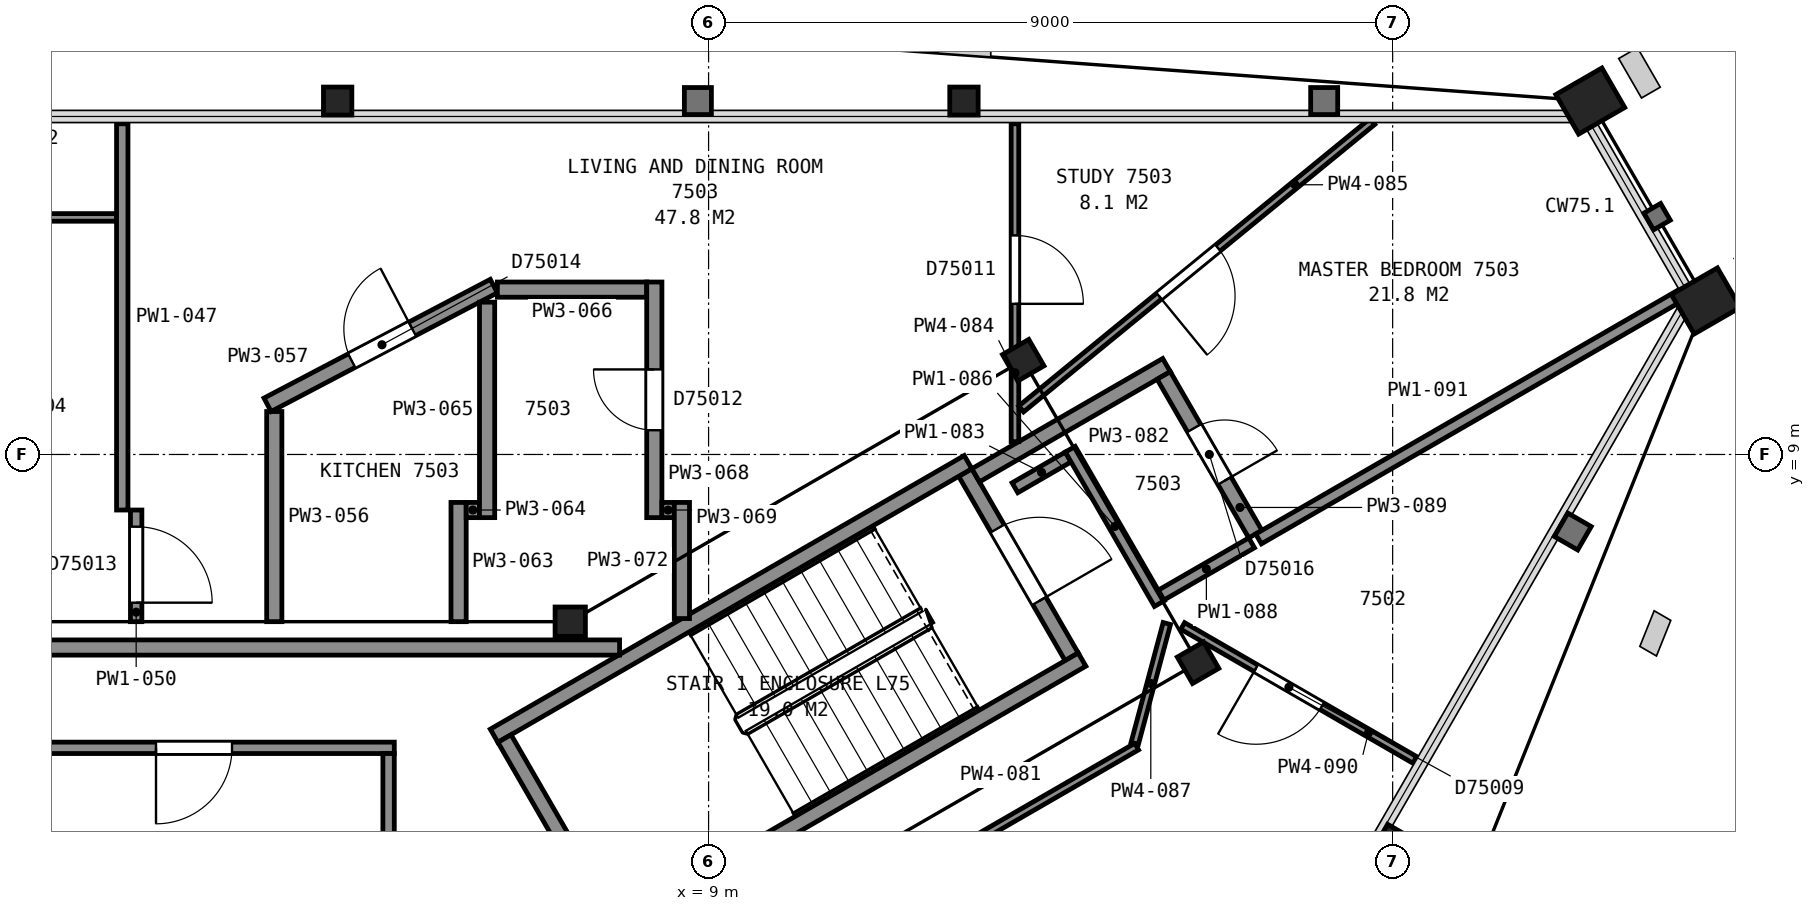
"""IFC4 building model, lengths in metres.
Left out: names, types, materials, properties, quantities, classifications, styles, units other than length and angle.
Written with IfcOpenShell. Run it as: python <this file> out.ifc"""

import sys

from ifc_helpers import new_model, si_unit, direction, frame, frame_2d, origin, origin_2d, place, context, subcontext, project, spatial, rectangle, hollow_rectangle, i_section, extrude, element, fill, save


model = new_model("IFC4")
c1 = context("Model", 3, precision=1e-05, world=origin(), true_north=direction((0.0, 1.0)))
c2 = subcontext(c1, "Body", "Model", "MODEL_VIEW")
j1 = project(units=[si_unit("LENGTHUNIT", "METRE"), si_unit("PLANEANGLEUNIT", "RADIAN")], contexts=[c1])
p1 = place(None, origin())
s1 = spatial("IfcSite", under=j1, at=p1, CompositionType="ELEMENT")
p2 = place(p1, origin())
s2 = spatial("IfcBuilding", under=s1, at=p2, CompositionType="ELEMENT")
p3 = place(p2, frame((0.0, 0.0, 297.3)))
s3 = spatial("IfcBuildingStorey", under=s2, at=p3, CompositionType="ELEMENT", Elevation=297.3)
p4 = place(p3, frame((20.6, 13.65, 0.0), z_axis=(0.0, 0.0, 1.0), x_axis=(0.5, -0.866025403784, 0.0)))
e1 = element("IfcColumn", 1, at=p4, inside=s3, PredefinedType="COLUMN", context=c2, shape_type="SweptSolid", body=[
    extrude(hollow_rectangle(XDim=0.6, YDim=0.7, WallThickness=0.04, at=origin_2d()), origin(), (0.0, 0.0, 1.0), 3.7),
])
for number, where, z_axis, x_axis in (
    (2, (12.36, 13.65, 0.0), (0.0, 0.0, 1.0), (1.0, 0.0, 0.0)),
    (3, (4.12, 13.65, 0.0), (0.0, 0.0, 1.0), (1.0, 0.0, 0.0)),
    (4, (18.0, 3.88, 0.0), (0.0, 0.0, 1.0), (-0.5, -0.866, 0.0)),
):
    element("IfcColumn", number, at=place(p3, frame(where, z_axis=z_axis, x_axis=x_axis)), inside=s3, PredefinedType="COLUMN", context=c2, shape_type="SweptSolid", body=[
        extrude(i_section(OverallWidth=0.373, OverallDepth=0.368, WebThickness=0.015, FlangeThickness=0.024, FilletRadius=0.015, at=origin_2d()), origin(), (0.0, 0.0, 1.0), 3.7),
    ])
p5 = place(p3, frame((22.12, 11.02, 0.0), z_axis=(0.0, 0.0, 1.0), x_axis=(0.5, -0.866025403784, 0.0)))
e5 = element("IfcColumn", 5, at=p5, inside=s3, PredefinedType="COLUMN", context=c2, shape_type="SweptSolid", body=[
    extrude(hollow_rectangle(XDim=0.6, YDim=0.7, WallThickness=0.04, at=origin_2d()), origin(), (0.0, 0.0, 1.0), 3.7),
])
for number, where, z_axis, x_axis in (
    (6, (15.44, 6.26, 0.0), (0.0, 0.0, 1.0), (0.5, -0.866, 0.0)),
    (7, (13.14, 10.24, 0.0), (0.0, 0.0, 1.0), (0.5, -0.866, 0.0)),
):
    element("IfcColumn", number, at=place(p3, frame(where, z_axis=z_axis, x_axis=x_axis)), inside=s3, PredefinedType="COLUMN", context=c2, shape_type="SweptSolid", body=[
        extrude(i_section(OverallWidth=0.401, OverallDepth=0.399, WebThickness=0.025, FlangeThickness=0.04, FilletRadius=0.015, at=origin_2d()), origin(), (0.0, 0.0, 1.0), 3.7),
    ])
p6 = place(p3, frame((7.18, 6.8, 0.0), z_axis=(0.0, 0.0, 1.0), x_axis=(1.0, 0.0, 0.0)))
e8 = element("IfcColumn", 8, at=p6, inside=s3, PredefinedType="COLUMN", context=c2, shape_type="SweptSolid", body=[
    extrude(i_section(OverallWidth=0.399, OverallDepth=0.386, WebThickness=0.021, FlangeThickness=0.033, FilletRadius=0.015, at=origin_2d()), origin(), (0.0, 0.0, 1.0), 3.7),
])
p7 = place(p3, frame((13.777, 6.338, 0.0), z_axis=(0.0, 0.0, 1.0), x_axis=(-0.500049511043, 0.865996816683, 0.0)))
e9 = element("IfcWall", 9, at=p7, inside=s3, PredefinedType="PARTITIONING", context=c2, shape_type="SweptSolid", body=[
    extrude(rectangle(XDim=2.8, YDim=0.2, at=frame_2d((1.4, 0.0))), origin(), (0.0, 0.0, 1.0), 3.45),
])
p8 = place(p7, frame((0.85, 0.0, 0.0)))
e10 = element("IfcOpeningElement", 10, at=p8, cuts=e9, PredefinedType="OPENING", context=c2, shape_type="SweptSolid", body=[
    extrude(rectangle(XDim=1.1, YDim=2.1, at=frame_2d((0.55, 1.05))), frame((0.0, 0.11, 0.0), z_axis=(0.0, -1.0, 0.0), x_axis=(1.0, 0.0, 0.0)), (0.0, 0.0, 1.0), 0.22),
])
for number, where, z_axis, x_axis in (
    (11, (6.178, 5.299, 0.0), (0.0, 0.0, 1.0), (0.866, 0.5, 0.0)),
    (12, (7.678, 2.701, 0.0), (0.0, 0.0, 1.0), (0.866, 0.5, 0.0)),
):
    element("IfcWall", number, at=place(p3, frame(where, z_axis=z_axis, x_axis=x_axis)), inside=s3, PredefinedType="PARTITIONING", context=c2, shape_type="SweptSolid", body=[
        extrude(rectangle(XDim=7.2, YDim=0.2, at=frame_2d((3.6, 0.0))), origin(), (0.0, 0.0, 1.0), 3.45),
    ])
p9 = place(p3, frame((7.715, 2.838, 0.0), z_axis=(0.0, 0.0, 1.0), x_axis=(-0.500049511043, 0.865996816683, 0.0)))
e13 = element("IfcWall", 13, at=p9, inside=s3, PredefinedType="PARTITIONING", context=c2, shape_type="SweptSolid", body=[
    extrude(rectangle(XDim=2.8, YDim=0.2, at=frame_2d((1.4, 0.0))), origin(), (0.0, 0.0, 1.0), 3.45),
])
p10 = place(p3, frame((7.829, 6.46, 0.0), z_axis=(0.0, 0.0, 1.0), x_axis=(-1.0, 0.0, 0.0)))
e14 = element("IfcWall", 14, at=p10, inside=s3, PredefinedType="PARTITIONING", context=c2, shape_type="SweptSolid", body=[
    extrude(rectangle(XDim=15.658, YDim=0.2, at=frame_2d((7.829, 0.0))), origin(), (0.0, 0.0, 1.0), 3.45),
])
p11 = place(p10, frame((12.168, 0.0, 0.0)))
e15 = element("IfcOpeningElement", 15, at=p11, cuts=e14, PredefinedType="OPENING", context=c2, shape_type="SweptSolid", body=[
    extrude(rectangle(XDim=1.2, YDim=2.1, at=frame_2d((0.6, 1.05))), frame((0.0, 0.11, 0.0), z_axis=(0.0, -1.0, 0.0), x_axis=(1.0, 0.0, 0.0)), (0.0, 0.0, 1.0), 0.22),
])
p12 = place(p3, frame((-0.245, 5.14, 0.0), z_axis=(0.0, 0.0, 1.0), x_axis=(1.0, 0.0, 0.0)))
e16 = element("IfcWall", 16, at=p12, inside=s3, PredefinedType="PARTITIONING", context=c2, shape_type="SweptSolid", body=[
    extrude(rectangle(XDim=5.11, YDim=0.15, at=frame_2d((2.555, 0.0))), origin(), (0.0, 0.0, 1.0), 3.45),
])
p13 = place(p12, frame((1.975, 0.0, 0.0)))
e17 = element("IfcOpeningElement", 17, at=p13, cuts=e16, PredefinedType="OPENING", context=c2, shape_type="SweptSolid", body=[
    extrude(rectangle(XDim=1.0, YDim=2.1, at=frame_2d((0.5, 1.05))), frame((0.0, 0.085, 0.0), z_axis=(0.0, -1.0, 0.0), x_axis=(1.0, 0.0, 0.0)), (0.0, 0.0, 1.0), 0.17),
])
p14 = place(p3, frame((4.79, 2.085, 0.0), z_axis=(0.0, 0.0, 1.0), x_axis=(0.0, 1.0, 0.0)))
e18 = element("IfcWall", 18, at=p14, inside=s3, PredefinedType="PARTITIONING", context=c2, shape_type="SweptSolid", body=[
    extrude(rectangle(XDim=2.98, YDim=0.15, at=frame_2d((1.49, 0.0))), origin(), (0.0, 0.0, 1.0), 3.45),
])
p15 = place(p3, frame((-3.109, 12.119, 0.0), z_axis=(0.0, 0.0, 1.0), x_axis=(1.0, 0.0, 0.0)))
e19 = element("IfcWall", 19, at=p15, inside=s3, PredefinedType="PARTITIONING", context=c2, shape_type="SweptSolid", body=[
    extrude(rectangle(XDim=4.32, YDim=0.1, at=frame_2d((2.16, 0.0))), origin(), (0.0, 0.0, 1.0), 2.723),
])
p16 = place(p15, frame((1.7, 0.0, 0.0)))
e20 = element("IfcOpeningElement", 20, at=p16, cuts=e19, PredefinedType="OPENING", context=c2, shape_type="SweptSolid", body=[
    extrude(rectangle(XDim=1.0, YDim=2.1, at=frame_2d((0.5, 1.05))), frame((0.0, 0.06, 0.0), z_axis=(0.0, -1.0, 0.0), x_axis=(1.0, 0.0, 0.0)), (0.0, 0.0, 1.0), 0.12),
])
p17 = place(p3, frame((1.286, 8.269, 0.0), z_axis=(0.0, 0.0, 1.0), x_axis=(0.0, 1.0, 0.0)))
e21 = element("IfcWall", 21, at=p17, inside=s3, PredefinedType="PARTITIONING", context=c2, shape_type="SweptSolid", body=[
    extrude(rectangle(XDim=5.082, YDim=0.15, at=frame_2d((2.541, 0.0))), origin(), (0.0, 0.0, 1.0), 2.723),
])
p18 = place(p3, frame((1.469, 8.269, 0.0), z_axis=(0.0, 0.0, 1.0), x_axis=(0.0, -1.0, 0.0)))
e22 = element("IfcWall", 22, at=p18, inside=s3, PredefinedType="PARTITIONING", context=c2, shape_type="SweptSolid", body=[
    extrude(rectangle(XDim=1.469, YDim=0.15, at=frame_2d((0.734, 0.0))), origin(), (0.0, 0.0, 1.0), 2.723),
])
p19 = place(p18, frame((0.219, 0.0, 0.0)))
e23 = element("IfcOpeningElement", 23, at=p19, cuts=e22, PredefinedType="OPENING", context=c2, shape_type="SweptSolid", body=[
    extrude(rectangle(XDim=1.0, YDim=2.1, at=frame_2d((0.5, 1.05))), frame((0.0, 0.085, 0.0), z_axis=(0.0, -1.0, 0.0), x_axis=(1.0, 0.0, 0.0)), (0.0, 0.0, 1.0), 0.17),
])
p20 = place(p3, frame((3.286, 6.8, 0.0), z_axis=(0.0, 0.0, 1.0), x_axis=(0.0, 1.0, 0.0)))
e24 = element("IfcWall", 24, at=p20, inside=s3, PredefinedType="PARTITIONING", context=c2, shape_type="SweptSolid", body=[
    extrude(rectangle(XDim=2.765, YDim=0.2, at=frame_2d((1.382, 0.0))), origin(), (0.0, 0.0, 1.0), 2.723),
])
p21 = place(p3, frame((6.175, 11.216, 0.0), z_axis=(0.0, 0.0, 1.0), x_axis=(-0.885512941371, -0.464614712062, 0.0)))
e25 = element("IfcWall", 25, at=p21, inside=s3, PredefinedType="PARTITIONING", context=c2, shape_type="SweptSolid", body=[
    extrude(rectangle(XDim=3.362, YDim=0.2, at=frame_2d((1.681, 0.0))), origin(), (0.0, 0.0, 1.0), 2.723),
])
p22 = place(p21, frame((1.212, 0.0, 0.0)))
e26 = element("IfcOpeningElement", 26, at=p22, cuts=e25, PredefinedType="OPENING", context=c2, shape_type="SweptSolid", body=[
    extrude(rectangle(XDim=0.9, YDim=2.1, at=frame_2d((0.45, 1.05))), frame((0.0, 0.11, 0.0), z_axis=(0.0, -1.0, 0.0), x_axis=(1.0, 0.0, 0.0)), (0.0, 0.0, 1.0), 0.22),
])
p23 = place(p3, frame((5.711, 6.8, 0.0), z_axis=(0.0, 0.0, 1.0), x_axis=(0.0, 1.0, 0.0)))
e27 = element("IfcWall", 27, at=p23, inside=s3, PredefinedType="PARTITIONING", context=c2, shape_type="SweptSolid", body=[
    extrude(rectangle(XDim=1.569, YDim=0.2, at=frame_2d((0.784, 0.0))), origin(), (0.0, 0.0, 1.0), 2.723),
])
p24 = place(p3, frame((5.811, 8.269, 0.0), z_axis=(0.0, 0.0, 1.0), x_axis=(1.0, 0.0, 0.0)))
e28 = element("IfcWall", 28, at=p24, inside=s3, PredefinedType="PARTITIONING", context=c2, shape_type="SweptSolid", body=[
    extrude(rectangle(XDim=0.175, YDim=0.2, at=frame_2d((0.087, 0.0))), origin(), (0.0, 0.0, 1.0), 2.723),
])
p25 = place(p3, frame((6.086, 8.169, 0.0), z_axis=(0.0, 0.0, 1.0), x_axis=(0.0, 1.0, 0.0)))
e29 = element("IfcWall", 29, at=p25, inside=s3, PredefinedType="PARTITIONING", context=c2, shape_type="SweptSolid", body=[
    extrude(rectangle(XDim=2.835, YDim=0.2, at=frame_2d((1.417, 0.0))), origin(), (0.0, 0.0, 1.0), 2.723),
])
p26 = place(p3, frame((6.221, 11.169, 0.0), z_axis=(0.0, 0.0, 1.0), x_axis=(1.0, 0.0, 0.0)))
e30 = element("IfcWall", 30, at=p26, inside=s3, PredefinedType="PARTITIONING", context=c2, shape_type="SweptSolid", body=[
    extrude(rectangle(XDim=1.965, YDim=0.2, at=frame_2d((0.982, 0.0))), origin(), (0.0, 0.0, 1.0), 2.723),
])
p27 = place(p3, frame((8.286, 8.169, 0.0), z_axis=(0.0, 0.0, 1.0), x_axis=(0.0, 1.0, 0.0)))
e31 = element("IfcWall", 31, at=p27, inside=s3, PredefinedType="PARTITIONING", context=c2, shape_type="SweptSolid", body=[
    extrude(rectangle(XDim=3.1, YDim=0.2, at=frame_2d((1.55, 0.0))), origin(), (0.0, 0.0, 1.0), 2.723),
])
p28 = place(p27, frame((1.15, 0.0, 0.0)))
e32 = element("IfcOpeningElement", 32, at=p28, cuts=e31, PredefinedType="OPENING", context=c2, shape_type="SweptSolid", body=[
    extrude(rectangle(XDim=0.8, YDim=2.1, at=frame_2d((0.4, 1.05))), frame((0.0, 0.11, 0.0), z_axis=(0.0, -1.0, 0.0), x_axis=(1.0, 0.0, 0.0)), (0.0, 0.0, 1.0), 0.22),
])
p29 = place(p3, frame((8.386, 8.269, 0.0), z_axis=(0.0, 0.0, 1.0), x_axis=(1.0, 0.0, 0.0)))
e33 = element("IfcWall", 33, at=p29, inside=s3, PredefinedType="PARTITIONING", context=c2, shape_type="SweptSolid", body=[
    extrude(rectangle(XDim=0.163, YDim=0.2, at=frame_2d((0.082, 0.0))), origin(), (0.0, 0.0, 1.0), 2.723),
])
p30 = place(p3, frame((8.649, 6.841, 0.0), z_axis=(0.0, 0.0, 1.0), x_axis=(0.0, 1.0, 0.0)))
e34 = element("IfcWall", 34, at=p30, inside=s3, PredefinedType="PARTITIONING", context=c2, shape_type="SweptSolid", body=[
    extrude(rectangle(XDim=1.528, YDim=0.2, at=frame_2d((0.764, 0.0))), origin(), (0.0, 0.0, 1.0), 2.723),
])
p31 = place(p3, frame((12.156, 3.727, 0.0), z_axis=(0.0, 0.0, 1.0), x_axis=(0.866012137121, 0.500022977831, 0.0)))
e35 = element("IfcWall", 35, at=p31, inside=s3, PredefinedType="PARTITIONING", context=c2, shape_type="SweptSolid", body=[
    extrude(rectangle(XDim=2.86, YDim=0.1, at=frame_2d((1.43, 0.0))), origin(), (0.0, 0.0, 1.0), 2.723),
])
p32 = place(p3, frame((12.514, 8.726, 0.0), z_axis=(0.0, 0.0, 1.0), x_axis=(0.865969617579, 0.500096612097, 0.0)))
e36 = element("IfcWall", 36, at=p32, inside=s3, PredefinedType="PARTITIONING", context=c2, shape_type="SweptSolid", body=[
    extrude(rectangle(XDim=2.899, YDim=0.2, at=frame_2d((1.45, 0.0))), origin(), (0.0, 0.0, 1.0), 2.723),
])
p33 = place(p3, frame((13.031, 8.562, 0.0), z_axis=(0.0, 0.0, 1.0), x_axis=(0.865798205633, 0.500393312429, 0.0)))
e37 = element("IfcWall", 37, at=p33, inside=s3, PredefinedType="PARTITIONING", context=c2, shape_type="SweptSolid", body=[
    extrude(rectangle(XDim=0.808, YDim=0.15, at=frame_2d((0.404, 0.0))), origin(), (0.0, 0.0, 1.0), 2.723),
])
p34 = place(p3, frame((13.031, 13.351, 0.0), z_axis=(0.0, 0.0, 1.0), x_axis=(0.0, -1.0, 0.0)))
e38 = element("IfcWall", 38, at=p34, inside=s3, PredefinedType="PARTITIONING", context=c2, shape_type="SweptSolid", body=[
    extrude(rectangle(XDim=4.183, YDim=0.1, at=frame_2d((2.091, 0.0))), origin(), (0.0, 0.0, 1.0), 2.723),
])
p35 = place(p34, frame((1.469, 0.0, 0.0)))
e39 = element("IfcOpeningElement", 39, at=p35, cuts=e38, PredefinedType="OPENING", context=c2, shape_type="SweptSolid", body=[
    extrude(rectangle(XDim=0.9, YDim=2.1, at=frame_2d((0.45, 1.05))), frame((0.0, 0.06, 0.0), z_axis=(0.0, -1.0, 0.0), x_axis=(1.0, 0.0, 0.0)), (0.0, 0.0, 1.0), 0.12),
])
p36 = place(p3, frame((17.733, 13.38, 0.0), z_axis=(0.0, 0.0, 1.0), x_axis=(-0.773858908961, -0.633358025939, 0.0)))
e40 = element("IfcWall", 40, at=p36, inside=s3, PredefinedType="PARTITIONING", context=c2, shape_type="SweptSolid", body=[
    extrude(rectangle(XDim=5.97, YDim=0.1, at=frame_2d((2.985, 0.0))), origin(), (0.0, 0.0, 1.0), 2.723),
])
p37 = place(p36, frame((2.626, 0.0, 0.0)))
e41 = element("IfcOpeningElement", 41, at=p37, cuts=e40, PredefinedType="OPENING", context=c2, shape_type="SweptSolid", body=[
    extrude(rectangle(XDim=1.0, YDim=2.1, at=frame_2d((0.5, 1.05))), frame((0.0, 0.06, 0.0), z_axis=(0.0, -1.0, 0.0), x_axis=(1.0, 0.0, 0.0)), (0.0, 0.0, 1.0), 0.12),
])
p38 = place(p3, frame((13.759, 9.069, 0.0), z_axis=(0.0, 0.0, 1.0), x_axis=(0.500046885369, -0.865998332812, 0.0)))
e42 = element("IfcWall", 42, at=p38, inside=s3, PredefinedType="PARTITIONING", context=c2, shape_type="SweptSolid", body=[
    extrude(rectangle(XDim=2.345, YDim=0.15, at=frame_2d((1.172, 0.0))), origin(), (0.0, 0.0, 1.0), 2.723),
])
p39 = place(p3, frame((14.607, 5.2, 0.0), z_axis=(0.0, 0.0, 1.0), x_axis=(0.258519214507, 0.966006115783, 0.0)))
e43 = element("IfcWall", 43, at=p39, inside=s3, PredefinedType="PARTITIONING", context=c2, shape_type="SweptSolid", body=[
    extrude(rectangle(XDim=1.632, YDim=0.1, at=frame_2d((0.816, 0.0))), origin(), (0.0, 0.0, 1.0), 2.723),
])
p40 = place(p3, frame((14.954, 7.149, 0.0), z_axis=(0.0, 0.0, 1.0), x_axis=(0.865960792519, 0.5001118933, 0.0)))
e44 = element("IfcWall", 44, at=p40, inside=s3, PredefinedType="PARTITIONING", context=c2, shape_type="SweptSolid", body=[
    extrude(rectangle(XDim=1.375, YDim=0.15, at=frame_2d((0.688, 0.0))), origin(), (0.0, 0.0, 1.0), 2.723),
])
p41 = place(p3, frame((16.194, 7.952, 0.0), z_axis=(0.0, 0.0, 1.0), x_axis=(-0.500125724882, 0.865952804321, 0.0)))
e45 = element("IfcWall", 45, at=p41, inside=s3, PredefinedType="PARTITIONING", context=c2, shape_type="SweptSolid", body=[
    extrude(rectangle(XDim=2.411, YDim=0.2, at=frame_2d((1.205, 0.0))), origin(), (0.0, 0.0, 1.0), 2.723),
])
p42 = place(p41, frame((0.811, 0.0, 0.0)))
e46 = element("IfcOpeningElement", 46, at=p42, cuts=e45, PredefinedType="OPENING", context=c2, shape_type="SweptSolid", body=[
    extrude(rectangle(XDim=0.8, YDim=2.1, at=frame_2d((0.4, 1.05))), frame((0.0, 0.11, 0.0), z_axis=(0.0, -1.0, 0.0), x_axis=(1.0, 0.0, 0.0)), (0.0, 0.0, 1.0), 0.22),
])
p43 = place(p3, frame((15.238, 6.744, 0.0), z_axis=(0.0, 0.0, 1.0), x_axis=(0.866104892567, -0.49986229611, 0.0)))
e47 = element("IfcWall", 47, at=p43, inside=s3, PredefinedType="PARTITIONING", context=c2, shape_type="SweptSolid", body=[
    extrude(rectangle(XDim=3.526, YDim=0.1, at=frame_2d((1.763, 0.0))), origin(), (0.0, 0.0, 1.0), 2.723),
])
p44 = place(p43, frame((1.114, 0.0, 0.0)))
e48 = element("IfcOpeningElement", 48, at=p44, cuts=e47, PredefinedType="OPENING", context=c2, shape_type="SweptSolid", body=[
    extrude(rectangle(XDim=1.0, YDim=2.1, at=frame_2d((0.5, 1.05))), frame((0.0, 0.06, 0.0), z_axis=(0.0, -1.0, 0.0), x_axis=(1.0, 0.0, 0.0)), (0.0, 0.0, 1.0), 0.12),
])
p45 = place(p3, frame((16.236, 7.889, 0.0), z_axis=(0.0, 0.0, 1.0), x_axis=(0.865995456094, 0.500051867335, 0.0)))
e49 = element("IfcWall", 49, at=p45, inside=s3, PredefinedType="PARTITIONING", context=c2, shape_type="SweptSolid", body=[
    extrude(rectangle(XDim=6.415, YDim=0.15, at=frame_2d((3.208, 0.0))), origin(), (0.0, 0.0, 1.0), 2.723),
])
p46 = place(p8, origin())
e50 = element("IfcDoor", 50, at=p46, inside=s3, OperationType="SINGLE_SWING_LEFT", PredefinedType="DOOR", context=c2, shape_type="SweptSolid", body=[
    extrude(rectangle(XDim=1.1, YDim=2.1, at=frame_2d((0.55, 1.05))), frame((0.0, 0.025, 0.0), z_axis=(0.0, -1.0, 0.0), x_axis=(1.0, 0.0, 0.0)), (0.0, 0.0, 1.0), 0.05),
])
fill(e10, e50)
p47 = place(p13, origin())
e51 = element("IfcDoor", 51, at=p47, inside=s3, OperationType="SINGLE_SWING_LEFT", PredefinedType="DOOR", context=c2, shape_type="SweptSolid", body=[
    extrude(rectangle(XDim=1.0, YDim=2.1, at=frame_2d((0.5, 1.05))), frame((0.0, 0.025, 0.0), z_axis=(0.0, -1.0, 0.0), x_axis=(1.0, 0.0, 0.0)), (0.0, 0.0, 1.0), 0.05),
])
fill(e17, e51)
p48 = place(p19, origin())
e52 = element("IfcDoor", 52, at=p48, inside=s3, OperationType="SINGLE_SWING_RIGHT", PredefinedType="DOOR", context=c2, shape_type="SweptSolid", body=[
    extrude(rectangle(XDim=1.0, YDim=2.1, at=frame_2d((0.5, 1.05))), frame((0.0, 0.025, 0.0), z_axis=(0.0, -1.0, 0.0), x_axis=(1.0, 0.0, 0.0)), (0.0, 0.0, 1.0), 0.05),
])
fill(e23, e52)
p49 = place(p22, origin())
e53 = element("IfcDoor", 53, at=p49, inside=s3, OperationType="SINGLE_SWING_LEFT", PredefinedType="DOOR", context=c2, shape_type="SweptSolid", body=[
    extrude(rectangle(XDim=0.9, YDim=2.1, at=frame_2d((0.45, 1.05))), frame((0.0, 0.025, 0.0), z_axis=(0.0, -1.0, 0.0), x_axis=(1.0, 0.0, 0.0)), (0.0, 0.0, 1.0), 0.05),
])
fill(e26, e53)
p50 = place(p28, origin())
e54 = element("IfcDoor", 54, at=p50, inside=s3, OperationType="SINGLE_SWING_RIGHT", PredefinedType="DOOR", context=c2, shape_type="SweptSolid", body=[
    extrude(rectangle(XDim=0.8, YDim=2.1, at=frame_2d((0.4, 1.05))), frame((0.0, 0.025, 0.0), z_axis=(0.0, -1.0, 0.0), x_axis=(1.0, 0.0, 0.0)), (0.0, 0.0, 1.0), 0.05),
])
fill(e32, e54)
p51 = place(p35, origin())
e55 = element("IfcDoor", 55, at=p51, inside=s3, OperationType="SINGLE_SWING_RIGHT", PredefinedType="DOOR", context=c2, shape_type="SweptSolid", body=[
    extrude(rectangle(XDim=0.9, YDim=2.1, at=frame_2d((0.45, 1.05))), frame((0.0, 0.025, 0.0), z_axis=(0.0, -1.0, 0.0), x_axis=(1.0, 0.0, 0.0)), (0.0, 0.0, 1.0), 0.05),
])
fill(e39, e55)
p52 = place(p37, origin())
e56 = element("IfcDoor", 56, at=p52, inside=s3, OperationType="SINGLE_SWING_RIGHT", PredefinedType="DOOR", context=c2, shape_type="SweptSolid", body=[
    extrude(rectangle(XDim=1.0, YDim=2.1, at=frame_2d((0.5, 1.05))), frame((0.0, 0.025, 0.0), z_axis=(0.0, -1.0, 0.0), x_axis=(1.0, 0.0, 0.0)), (0.0, 0.0, 1.0), 0.05),
])
fill(e41, e56)
p53 = place(p42, origin())
e57 = element("IfcDoor", 57, at=p53, inside=s3, OperationType="SINGLE_SWING_LEFT", PredefinedType="DOOR", context=c2, shape_type="SweptSolid", body=[
    extrude(rectangle(XDim=0.8, YDim=2.1, at=frame_2d((0.4, 1.05))), frame((0.0, 0.025, 0.0), z_axis=(0.0, -1.0, 0.0), x_axis=(1.0, 0.0, 0.0)), (0.0, 0.0, 1.0), 0.05),
])
fill(e46, e57)
p54 = place(p44, origin())
e58 = element("IfcDoor", 58, at=p54, inside=s3, OperationType="SINGLE_SWING_LEFT", PredefinedType="DOOR", context=c2, shape_type="SweptSolid", body=[
    extrude(rectangle(XDim=1.0, YDim=2.1, at=frame_2d((0.5, 1.05))), frame((0.0, 0.025, 0.0), z_axis=(0.0, -1.0, 0.0), x_axis=(1.0, 0.0, 0.0)), (0.0, 0.0, 1.0), 0.05),
])
fill(e48, e58)
save(model, sys.argv[1])
